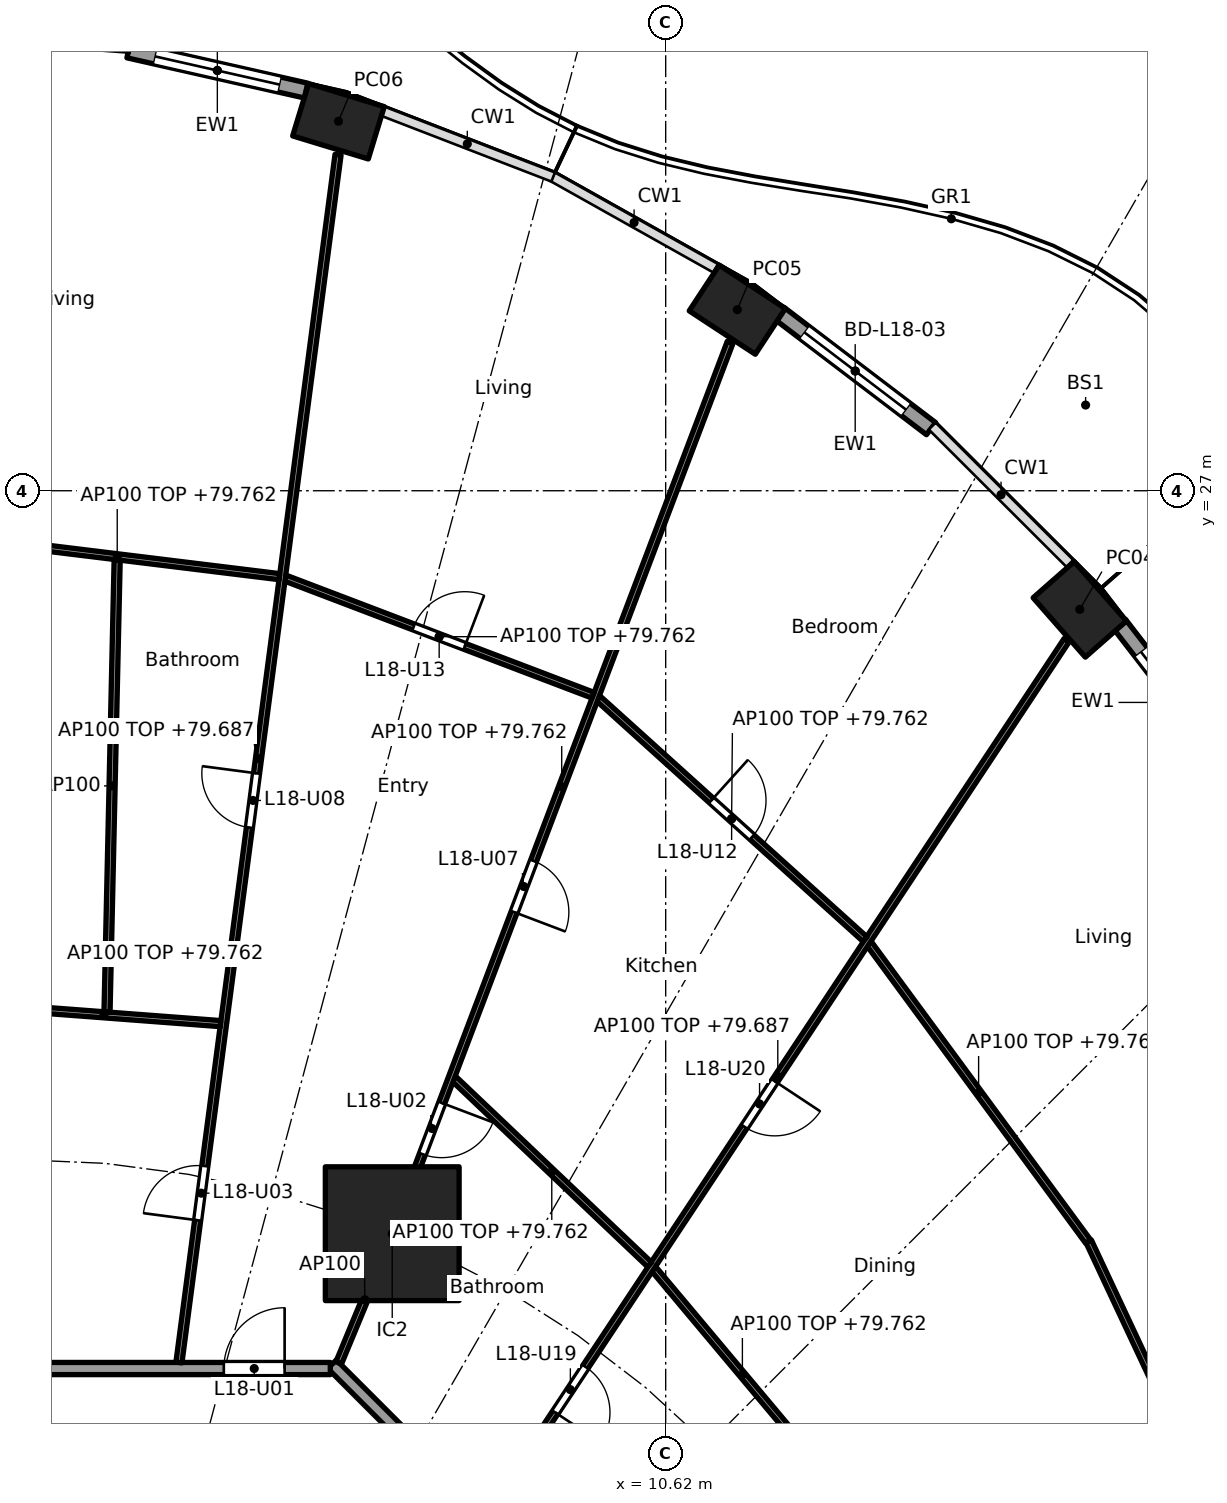
"""IFC4 building model, lengths in metres.
Left out: names, types, materials, properties, quantities, classifications, styles, units other than length and angle.
Written with IfcOpenShell. Run it as: python <this file> out.ifc"""

import sys

from ifc_helpers import new_model, si_unit, direction, frame, frame_2d, origin, origin_2d, place, context, subcontext, project, spatial, rectangle, hollow_rectangle, extrude, element, fill, save


model = new_model("IFC4")
c1 = context("Model", 3, precision=1e-05, world=origin(), true_north=direction((0.0, 1.0)))
c2 = subcontext(c1, "Body", "Model", "MODEL_VIEW")
j1 = project(units=[si_unit("LENGTHUNIT", "METRE"), si_unit("PLANEANGLEUNIT", "RADIAN")], contexts=[c1])
p1 = place(None, origin())
s1 = spatial("IfcSite", under=j1, at=p1, CompositionType="ELEMENT")
p2 = place(p1, origin())
s2 = spatial("IfcBuilding", under=s1, at=p2, CompositionType="ELEMENT")
p3 = place(p2, frame((0.0, 0.0, 77.0)))
s3 = spatial("IfcBuildingStorey", under=s2, at=p3, CompositionType="ELEMENT", Elevation=77.0)
for number, where, z_axis, x_axis in (
    (1, (17.43, 25.049, 0.0), (0.0, 0.0, 1.0), (-0.66, 0.751, 0.0)),
    (2, (11.798, 29.978, 0.0), (0.0, 0.0, 1.0), (-0.836, 0.549, 0.0)),
    (3, (5.239, 33.076, 0.0), (0.0, 0.0, 1.0), (-0.957, 0.292, 0.0)),
):
    element("IfcColumn", number, at=place(p3, frame(where, z_axis=z_axis, x_axis=x_axis)), inside=s3, PredefinedType="COLUMN", context=c2, shape_type="SweptSolid", body=[
        extrude(hollow_rectangle(XDim=1.3, YDim=0.9, WallThickness=0.045, at=origin_2d()), origin(), (0.0, 0.0, 1.0), 3.7),
    ])
p4 = place(p3, frame((6.123, 14.782, 0.0), z_axis=(0.0, 0.0, 1.0), x_axis=(1.0, 0.0, 0.0)))
e4 = element("IfcColumn", 4, at=p4, inside=s3, PredefinedType="COLUMN", context=c2, shape_type="SweptSolid", body=[
    extrude(rectangle(XDim=2.2, YDim=2.2, at=origin_2d()), origin(), (0.0, 0.0, 1.0), 3.7),
])
p5 = place(p3, frame((18.081, 24.811, 0.0), z_axis=(0.0, 0.0, 1.0), x_axis=(0.610458970322, -0.792047880847, 0.0)))
e5 = element("IfcWall", 5, at=p5, inside=s3, PredefinedType="SOLIDWALL", context=c2, shape_type="SweptSolid", body=[
    extrude(rectangle(XDim=3.263, YDim=0.25, at=frame_2d((1.631, 0.0))), origin(), (0.0, 0.0, 1.0), 3.44),
])
p6 = place(p5, frame((0.582, 0.0, 0.0)))
e6 = element("IfcOpeningElement", 6, at=p6, cuts=e5, PredefinedType="OPENING", context=c2, shape_type="SweptSolid", body=[
    extrude(rectangle(XDim=2.1, YDim=2.4, at=frame_2d((1.05, 1.2))), frame((0.0, 0.135, 0.0), z_axis=(0.0, -1.0, 0.0), x_axis=(1.0, 0.0, 0.0)), (0.0, 0.0, 1.0), 0.27),
])
p7 = place(p3, frame((12.489, 29.917, 0.0), z_axis=(0.0, 0.0, 1.0), x_axis=(0.796037575978, -0.605247203736, 0.0)))
e7 = element("IfcWall", 7, at=p7, inside=s3, PredefinedType="SOLIDWALL", context=c2, shape_type="SweptSolid", body=[
    extrude(rectangle(XDim=3.134, YDim=0.25, at=frame_2d((1.567, 0.0))), origin(), (0.0, 0.0, 1.0), 3.44),
])
p8 = place(p7, frame((0.517, 0.0, 0.0)))
e8 = element("IfcOpeningElement", 8, at=p8, cuts=e7, PredefinedType="OPENING", context=c2, shape_type="SweptSolid", body=[
    extrude(rectangle(XDim=2.1, YDim=2.4, at=frame_2d((1.05, 1.2))), frame((0.0, 0.135, 0.0), z_axis=(0.0, -1.0, 0.0), x_axis=(1.0, 0.0, 0.0)), (0.0, 0.0, 1.0), 0.27),
])
p9 = place(p3, frame((1.787, 34.241, 0.0), z_axis=(0.0, 0.0, 1.0), x_axis=(0.975317607872, -0.220806620767, 0.0)))
e9 = element("IfcWall", 9, at=p9, inside=s3, PredefinedType="SOLIDWALL", context=c2, shape_type="SweptSolid", body=[
    extrude(rectangle(XDim=2.993, YDim=0.25, at=frame_2d((1.497, 0.0))), origin(), (0.0, 0.0, 1.0), 3.44),
])
p10 = place(p9, frame((0.447, 0.0, 0.0)))
e10 = element("IfcOpeningElement", 10, at=p10, cuts=e9, PredefinedType="OPENING", context=c2, shape_type="SweptSolid", body=[
    extrude(rectangle(XDim=2.1, YDim=2.4, at=frame_2d((1.05, 1.2))), frame((0.0, 0.135, 0.0), z_axis=(0.0, -1.0, 0.0), x_axis=(1.0, 0.0, 0.0)), (0.0, 0.0, 1.0), 0.27),
])
p11 = place(p3, frame((12.635, 5.134, 0.0), z_axis=(0.0, 0.0, 1.0), x_axis=(-0.707106781187, 0.707106781187, 0.0)))
e11 = element("IfcWall", 11, at=p11, inside=s3, PredefinedType="PARTITIONING", context=c2, shape_type="SweptSolid", body=[
    extrude(rectangle(XDim=10.609, YDim=0.2, at=frame_2d((5.305, 0.0))), origin(), (0.0, 0.0, 1.0), 3.44),
])
p12 = place(p3, frame((5.104, 12.565, 0.0), z_axis=(0.0, 0.0, 1.0), x_axis=(-1.0, 0.0, 0.0)))
e12 = element("IfcWall", 12, at=p12, inside=s3, PredefinedType="PARTITIONING", context=c2, shape_type="SweptSolid", body=[
    extrude(rectangle(XDim=10.409, YDim=0.2, at=frame_2d((5.205, 0.0))), origin(), (0.0, 0.0, 1.0), 3.44),
])
p13 = place(p12, frame((0.751, 0.0, 0.0)))
e13 = element("IfcOpeningElement", 13, at=p13, cuts=e12, PredefinedType="OPENING", context=c2, shape_type="SweptSolid", body=[
    extrude(rectangle(XDim=1.0, YDim=2.1, at=frame_2d((0.5, 1.05))), frame((0.0, 0.11, 0.0), z_axis=(0.0, -1.0, 0.0), x_axis=(1.0, 0.0, 0.0)), (0.0, 0.0, 1.0), 0.22),
])
p14 = place(p3, frame((20.231, 8.995, 0.0), z_axis=(0.0, 0.0, 1.0), x_axis=(-0.424587886407, 0.905386727712, 0.0)))
e14 = element("IfcWall", 14, at=p14, inside=s3, PredefinedType="PARTITIONING", context=c2, shape_type="SweptSolid", body=[
    extrude(rectangle(XDim=6.254, YDim=0.1, at=frame_2d((3.127, 0.0))), origin(), (0.0, 0.0, 1.0), 2.762),
])
p15 = place(p14, frame((2.652, 0.0, 0.0)))
e15 = element("IfcOpeningElement", 15, at=p15, cuts=e14, PredefinedType="OPENING", context=c2, shape_type="SweptSolid", body=[
    extrude(rectangle(XDim=0.9, YDim=2.1, at=frame_2d((0.45, 1.05))), frame((0.0, 0.06, 0.0), z_axis=(0.0, -1.0, 0.0), x_axis=(1.0, 0.0, 0.0)), (0.0, 0.0, 1.0), 0.12),
])
p16 = place(p3, frame((13.339, 10.725, 0.0), z_axis=(0.0, 0.0, 1.0), x_axis=(-0.642515455924, 0.766272724882, 0.0)))
e16 = element("IfcWall", 16, at=p16, inside=s3, PredefinedType="PARTITIONING", context=c2, shape_type="SweptSolid", body=[
    extrude(rectangle(XDim=4.537, YDim=0.1, at=frame_2d((2.269, 0.0))), origin(), (0.0, 0.0, 1.0), 2.762),
])
p17 = place(p3, frame((17.567, 14.653, 0.0), z_axis=(0.0, 0.0, 1.0), x_axis=(-0.592391983588, 0.80564988536, 0.0)))
e17 = element("IfcWall", 17, at=p17, inside=s3, PredefinedType="PARTITIONING", context=c2, shape_type="SweptSolid", body=[
    extrude(rectangle(XDim=6.08, YDim=0.1, at=frame_2d((3.04, 0.0))), origin(), (0.0, 0.0, 1.0), 2.762),
])
p18 = place(p3, frame((7.713, 10.195, 0.0), z_axis=(0.0, 0.0, 1.0), x_axis=(0.552111071171, 0.833770571015, 0.0)))
e18 = element("IfcWall", 18, at=p18, inside=s3, PredefinedType="PARTITIONING", context=c2, shape_type="SweptSolid", body=[
    extrude(rectangle(XDim=17.208, YDim=0.1, at=frame_2d((8.604, 0.0))), origin(), (0.0, 0.0, 1.0), 2.687),
])
p19 = place(p18, frame((1.976, 0.0, 0.0)))
e19 = element("IfcOpeningElement", 19, at=p19, cuts=e18, PredefinedType="OPENING", context=c2, shape_type="SweptSolid", body=[
    extrude(rectangle(XDim=0.9, YDim=2.1, at=frame_2d((0.45, 1.05))), frame((0.0, 0.06, 0.0), z_axis=(0.0, -1.0, 0.0), x_axis=(1.0, 0.0, 0.0)), (0.0, 0.0, 1.0), 0.12),
])
p20 = place(p18, frame((7.611, 0.0, 0.0)))
e20 = element("IfcOpeningElement", 20, at=p20, cuts=e18, PredefinedType="OPENING", context=c2, shape_type="SweptSolid", body=[
    extrude(rectangle(XDim=0.9, YDim=2.1, at=frame_2d((0.45, 1.05))), frame((0.0, 0.06, 0.0), z_axis=(0.0, -1.0, 0.0), x_axis=(1.0, 0.0, 0.0)), (0.0, 0.0, 1.0), 0.12),
])
p21 = place(p3, frame((10.355, 14.274, 0.0), z_axis=(0.0, 0.0, 1.0), x_axis=(-0.725219204328, 0.688518050361, 0.0)))
e21 = element("IfcWall", 21, at=p21, inside=s3, PredefinedType="PARTITIONING", context=c2, shape_type="SweptSolid", body=[
    extrude(rectangle(XDim=4.437, YDim=0.1, at=frame_2d((2.219, 0.0))), origin(), (0.0, 0.0, 1.0), 2.762),
])
p22 = place(p3, frame((13.898, 19.625, 0.0), z_axis=(0.0, 0.0, 1.0), x_axis=(-0.742400132046, 0.669956747812, 0.0)))
e22 = element("IfcWall", 22, at=p22, inside=s3, PredefinedType="PARTITIONING", context=c2, shape_type="SweptSolid", body=[
    extrude(rectangle(XDim=5.911, YDim=0.1, at=frame_2d((2.956, 0.0))), origin(), (0.0, 0.0, 1.0), 2.762),
])
p23 = place(p22, frame((2.506, 0.0, 0.0)))
e23 = element("IfcOpeningElement", 23, at=p23, cuts=e22, PredefinedType="OPENING", context=c2, shape_type="SweptSolid", body=[
    extrude(rectangle(XDim=0.9, YDim=2.1, at=frame_2d((0.45, 1.05))), frame((0.0, 0.06, 0.0), z_axis=(0.0, -1.0, 0.0), x_axis=(1.0, 0.0, 0.0)), (0.0, 0.0, 1.0), 0.12),
])
p24 = place(p3, frame((5.243, 12.657, 0.0), z_axis=(0.0, 0.0, 1.0), x_axis=(0.382719158442, 0.923864733477, 0.0)))
e24 = element("IfcWall", 24, at=p24, inside=s3, PredefinedType="PARTITIONING", context=c2, shape_type="SweptSolid", body=[
    extrude(rectangle(XDim=2.25, YDim=0.1, at=frame_2d((1.125, 0.0))), origin(), (0.0, 0.0, 1.0), 3.44),
])
p25 = place(p3, frame((6.141, 14.829, 0.0), z_axis=(0.0, 0.0, 1.0), x_axis=(0.354477134193, 0.935064682968, 0.0)))
e25 = element("IfcWall", 25, at=p25, inside=s3, PredefinedType="PARTITIONING", context=c2, shape_type="SweptSolid", body=[
    extrude(rectangle(XDim=15.626, YDim=0.1, at=frame_2d((7.813, 0.0))), origin(), (0.0, 0.0, 1.0), 2.762),
])
p26 = place(p25, frame((1.35, 0.0, 0.0)))
e26 = element("IfcOpeningElement", 26, at=p26, cuts=e25, PredefinedType="OPENING", context=c2, shape_type="SweptSolid", body=[
    extrude(rectangle(XDim=0.9, YDim=2.1, at=frame_2d((0.45, 1.05))), frame((0.0, 0.06, 0.0), z_axis=(0.0, -1.0, 0.0), x_axis=(1.0, 0.0, 0.0)), (0.0, 0.0, 1.0), 0.12),
])
p27 = place(p25, frame((5.606, 0.0, 0.0)))
e27 = element("IfcOpeningElement", 27, at=p27, cuts=e25, PredefinedType="OPENING", context=c2, shape_type="SweptSolid", body=[
    extrude(rectangle(XDim=0.9, YDim=2.1, at=frame_2d((0.45, 1.05))), frame((0.0, 0.06, 0.0), z_axis=(0.0, -1.0, 0.0), x_axis=(1.0, 0.0, 0.0)), (0.0, 0.0, 1.0), 0.12),
])
p28 = place(p3, frame((9.426, 23.637, 0.0), z_axis=(0.0, 0.0, 1.0), x_axis=(-0.93461405629, 0.355663557011, 0.0)))
e28 = element("IfcWall", 28, at=p28, inside=s3, PredefinedType="PARTITIONING", context=c2, shape_type="SweptSolid", body=[
    extrude(rectangle(XDim=5.417, YDim=0.1, at=frame_2d((2.708, 0.0))), origin(), (0.0, 0.0, 1.0), 2.762),
])
p29 = place(p28, frame((2.258, 0.0, 0.0)))
e29 = element("IfcOpeningElement", 29, at=p29, cuts=e28, PredefinedType="OPENING", context=c2, shape_type="SweptSolid", body=[
    extrude(rectangle(XDim=0.9, YDim=2.1, at=frame_2d((0.45, 1.05))), frame((0.0, 0.06, 0.0), z_axis=(0.0, -1.0, 0.0), x_axis=(1.0, 0.0, 0.0)), (0.0, 0.0, 1.0), 0.12),
])
p30 = place(p3, frame((2.615, 12.664, 0.0), z_axis=(0.0, 0.0, 1.0), x_axis=(0.130614967904, 0.99143316979, 0.0)))
e30 = element("IfcWall", 30, at=p30, inside=s3, PredefinedType="PARTITIONING", context=c2, shape_type="SweptSolid", body=[
    extrude(rectangle(XDim=20.034, YDim=0.1, at=frame_2d((10.017, 0.0))), origin(), (0.0, 0.0, 1.0), 2.687),
])
p31 = place(p30, frame((2.359, 0.0, 0.0)))
e31 = element("IfcOpeningElement", 31, at=p31, cuts=e30, PredefinedType="OPENING", context=c2, shape_type="SweptSolid", body=[
    extrude(rectangle(XDim=0.9, YDim=2.1, at=frame_2d((0.45, 1.05))), frame((0.0, 0.06, 0.0), z_axis=(0.0, -1.0, 0.0), x_axis=(1.0, 0.0, 0.0)), (0.0, 0.0, 1.0), 0.12),
])
p32 = place(p30, frame((8.873, 0.0, 0.0)))
e32 = element("IfcOpeningElement", 32, at=p32, cuts=e30, PredefinedType="OPENING", context=c2, shape_type="SweptSolid", body=[
    extrude(rectangle(XDim=0.9, YDim=2.1, at=frame_2d((0.45, 1.05))), frame((0.0, 0.06, 0.0), z_axis=(0.0, -1.0, 0.0), x_axis=(1.0, 0.0, 0.0)), (0.0, 0.0, 1.0), 0.12),
])
p33 = place(p3, frame((3.299, 18.237, 0.0), z_axis=(0.0, 0.0, 1.0), x_axis=(-0.997152243414, 0.075414875552, 0.0)))
e33 = element("IfcWall", 33, at=p33, inside=s3, PredefinedType="PARTITIONING", context=c2, shape_type="SweptSolid", body=[
    extrude(rectangle(XDim=3.846, YDim=0.1, at=frame_2d((1.923, 0.0))), origin(), (0.0, 0.0, 1.0), 2.762),
])
p34 = place(p3, frame((4.267, 25.587, 0.0), z_axis=(0.0, 0.0, 1.0), x_axis=(-0.992576206119, 0.121624319302, 0.0)))
e34 = element("IfcWall", 34, at=p34, inside=s3, PredefinedType="PARTITIONING", context=c2, shape_type="SweptSolid", body=[
    extrude(rectangle(XDim=5.374, YDim=0.1, at=frame_2d((2.687, 0.0))), origin(), (0.0, 0.0, 1.0), 2.762),
])
p35 = place(p3, frame((1.433, 18.428, 0.0), z_axis=(0.0, 0.0, 1.0), x_axis=(0.022419421812, 0.999748653175, 0.0)))
e35 = element("IfcWall", 35, at=p35, inside=s3, PredefinedType="PARTITIONING", context=c2, shape_type="SweptSolid", body=[
    extrude(rectangle(XDim=7.438, YDim=0.1, at=frame_2d((3.719, 0.0))), origin(), (0.0, 0.0, 1.0), 3.44),
])
p36 = place(p6, origin())
e36 = element("IfcDoor", 36, at=p36, inside=s3, OperationType="SLIDING_TO_LEFT", PredefinedType="DOOR", context=c2, shape_type="SweptSolid", body=[
    extrude(rectangle(XDim=2.1, YDim=2.4, at=frame_2d((1.05, 1.2))), frame((0.0, 0.025, 0.0), z_axis=(0.0, -1.0, 0.0), x_axis=(1.0, 0.0, 0.0)), (0.0, 0.0, 1.0), 0.05),
])
fill(e6, e36)
p37 = place(p8, origin())
e37 = element("IfcDoor", 37, at=p37, inside=s3, OperationType="SLIDING_TO_LEFT", PredefinedType="DOOR", context=c2, shape_type="SweptSolid", body=[
    extrude(rectangle(XDim=2.1, YDim=2.4, at=frame_2d((1.05, 1.2))), frame((0.0, 0.025, 0.0), z_axis=(0.0, -1.0, 0.0), x_axis=(1.0, 0.0, 0.0)), (0.0, 0.0, 1.0), 0.05),
])
fill(e8, e37)
p38 = place(p10, origin())
e38 = element("IfcDoor", 38, at=p38, inside=s3, OperationType="SLIDING_TO_LEFT", PredefinedType="DOOR", context=c2, shape_type="SweptSolid", body=[
    extrude(rectangle(XDim=2.1, YDim=2.4, at=frame_2d((1.05, 1.2))), frame((0.0, 0.025, 0.0), z_axis=(0.0, -1.0, 0.0), x_axis=(1.0, 0.0, 0.0)), (0.0, 0.0, 1.0), 0.05),
])
fill(e10, e38)
p39 = place(p13, frame((1.0, 0.0, 0.0), x_axis=(-1.0, 0.0, 0.0)))
e39 = element("IfcDoor", 39, at=p39, inside=s3, OperationType="SINGLE_SWING_RIGHT", PredefinedType="DOOR", context=c2, shape_type="SweptSolid", body=[
    extrude(rectangle(XDim=1.0, YDim=2.1, at=frame_2d((0.5, 1.05))), frame((0.0, 0.025, 0.0), z_axis=(0.0, -1.0, 0.0), x_axis=(1.0, 0.0, 0.0)), (0.0, 0.0, 1.0), 0.05),
])
fill(e13, e39)
p40 = place(p26, frame((0.9, 0.0, 0.0), x_axis=(-1.0, 0.0, 0.0)))
e40 = element("IfcDoor", 40, at=p40, inside=s3, OperationType="SINGLE_SWING_LEFT", PredefinedType="DOOR", context=c2, shape_type="SweptSolid", body=[
    extrude(rectangle(XDim=0.9, YDim=2.1, at=frame_2d((0.45, 1.05))), frame((0.0, 0.025, 0.0), z_axis=(0.0, -1.0, 0.0), x_axis=(1.0, 0.0, 0.0)), (0.0, 0.0, 1.0), 0.05),
])
fill(e26, e40)
p41 = place(p31, origin())
e41 = element("IfcDoor", 41, at=p41, inside=s3, OperationType="SINGLE_SWING_LEFT", PredefinedType="DOOR", context=c2, shape_type="SweptSolid", body=[
    extrude(rectangle(XDim=0.9, YDim=2.1, at=frame_2d((0.45, 1.05))), frame((0.0, 0.025, 0.0), z_axis=(0.0, -1.0, 0.0), x_axis=(1.0, 0.0, 0.0)), (0.0, 0.0, 1.0), 0.05),
])
fill(e31, e41)
p42 = place(p27, frame((0.9, 0.0, 0.0), x_axis=(-1.0, 0.0, 0.0)))
e42 = element("IfcDoor", 42, at=p42, inside=s3, OperationType="SINGLE_SWING_RIGHT", PredefinedType="DOOR", context=c2, shape_type="SweptSolid", body=[
    extrude(rectangle(XDim=0.9, YDim=2.1, at=frame_2d((0.45, 1.05))), frame((0.0, 0.025, 0.0), z_axis=(0.0, -1.0, 0.0), x_axis=(1.0, 0.0, 0.0)), (0.0, 0.0, 1.0), 0.05),
])
fill(e27, e42)
p43 = place(p32, origin())
e43 = element("IfcDoor", 43, at=p43, inside=s3, OperationType="SINGLE_SWING_RIGHT", PredefinedType="DOOR", context=c2, shape_type="SweptSolid", body=[
    extrude(rectangle(XDim=0.9, YDim=2.1, at=frame_2d((0.45, 1.05))), frame((0.0, 0.025, 0.0), z_axis=(0.0, -1.0, 0.0), x_axis=(1.0, 0.0, 0.0)), (0.0, 0.0, 1.0), 0.05),
])
fill(e32, e43)
p44 = place(p23, frame((0.9, 0.0, 0.0), x_axis=(-1.0, 0.0, 0.0)))
e44 = element("IfcDoor", 44, at=p44, inside=s3, OperationType="SINGLE_SWING_LEFT", PredefinedType="DOOR", context=c2, shape_type="SweptSolid", body=[
    extrude(rectangle(XDim=0.9, YDim=2.1, at=frame_2d((0.45, 1.05))), frame((0.0, 0.025, 0.0), z_axis=(0.0, -1.0, 0.0), x_axis=(1.0, 0.0, 0.0)), (0.0, 0.0, 1.0), 0.05),
])
fill(e23, e44)
p45 = place(p29, frame((0.9, 0.0, 0.0), x_axis=(-1.0, 0.0, 0.0)))
e45 = element("IfcDoor", 45, at=p45, inside=s3, OperationType="SINGLE_SWING_RIGHT", PredefinedType="DOOR", context=c2, shape_type="SweptSolid", body=[
    extrude(rectangle(XDim=0.9, YDim=2.1, at=frame_2d((0.45, 1.05))), frame((0.0, 0.025, 0.0), z_axis=(0.0, -1.0, 0.0), x_axis=(1.0, 0.0, 0.0)), (0.0, 0.0, 1.0), 0.05),
])
fill(e29, e45)
p46 = place(p19, frame((0.9, 0.0, 0.0), x_axis=(-1.0, 0.0, 0.0)))
e46 = element("IfcDoor", 46, at=p46, inside=s3, OperationType="SINGLE_SWING_RIGHT", PredefinedType="DOOR", context=c2, shape_type="SweptSolid", body=[
    extrude(rectangle(XDim=0.9, YDim=2.1, at=frame_2d((0.45, 1.05))), frame((0.0, 0.025, 0.0), z_axis=(0.0, -1.0, 0.0), x_axis=(1.0, 0.0, 0.0)), (0.0, 0.0, 1.0), 0.05),
])
fill(e19, e46)
p47 = place(p20, frame((0.9, 0.0, 0.0), x_axis=(-1.0, 0.0, 0.0)))
e47 = element("IfcDoor", 47, at=p47, inside=s3, OperationType="SINGLE_SWING_LEFT", PredefinedType="DOOR", context=c2, shape_type="SweptSolid", body=[
    extrude(rectangle(XDim=0.9, YDim=2.1, at=frame_2d((0.45, 1.05))), frame((0.0, 0.025, 0.0), z_axis=(0.0, -1.0, 0.0), x_axis=(1.0, 0.0, 0.0)), (0.0, 0.0, 1.0), 0.05),
])
fill(e20, e47)
save(model, sys.argv[1])
